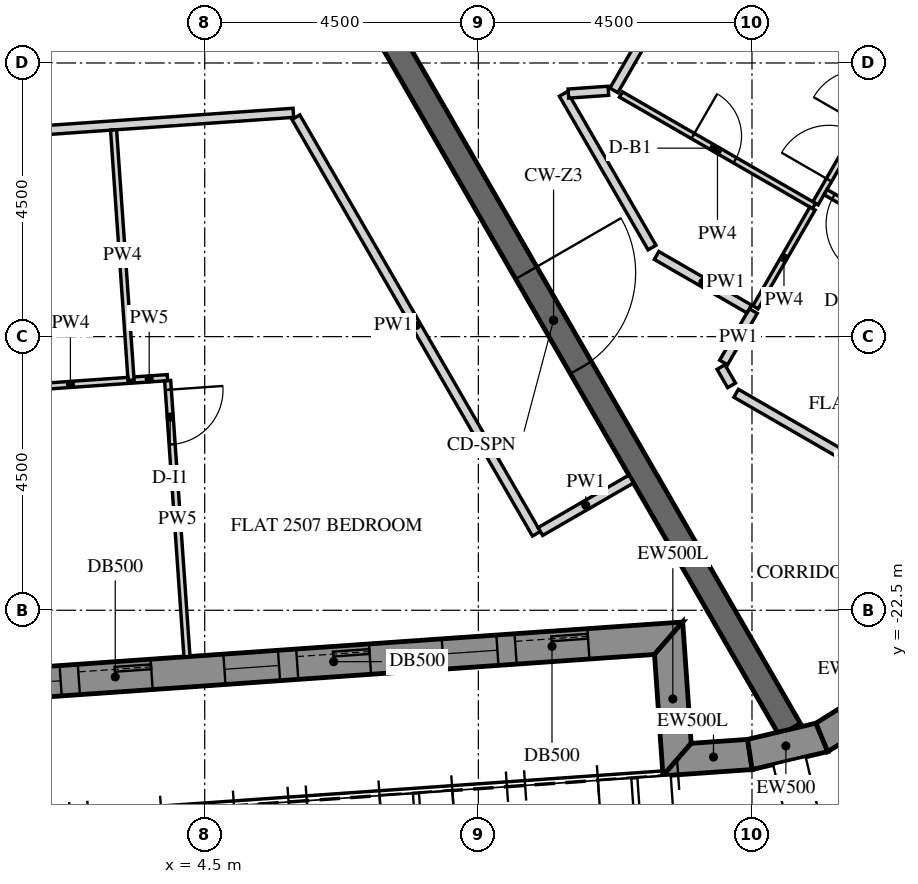
"""IFC4 building model, lengths in metres.
Left out: names, types, materials, properties, quantities, classifications, styles, units other than length and angle.
Written with IfcOpenShell. Run it as: python <this file> out.ifc"""

import sys

from ifc_helpers import new_model, si_unit, direction, frame, frame_2d, origin, place, context, subcontext, project, spatial, polyline, rectangle, outline, extrude, element, fill, save


model = new_model("IFC4")
c1 = context("Model", 3, precision=1e-05, world=origin(), true_north=direction((0.0, 1.0)))
c2 = subcontext(c1, "Body", "Model", "MODEL_VIEW")
j1 = project(units=[si_unit("LENGTHUNIT", "METRE"), si_unit("PLANEANGLEUNIT", "RADIAN")], contexts=[c1])
p1 = place(None, origin())
s1 = spatial("IfcSite", under=j1, at=p1, CompositionType="ELEMENT")
p2 = place(p1, origin())
s2 = spatial("IfcBuilding", under=s1, at=p2, CompositionType="ELEMENT")
p3 = place(p2, frame((0.0, 0.0, 314.7)))
s3 = spatial("IfcBuildingStorey", under=s2, at=p3, CompositionType="ELEMENT", Elevation=314.7)
p4 = place(p3, frame((-10.86, -24.567, -0.15), z_axis=(0.0, 0.0, 1.0), x_axis=(0.997564329317, 0.06975248292, 0.0)))
e1 = element("IfcWall", 1, at=p4, inside=s3, PredefinedType="SOLIDWALL", context=c2, shape_type="SweptSolid", body=[
    extrude(outline(polyline([(0.25, -0.25), (22.795, -0.25), (23.295, 0.25), (-0.25, 0.25), (0.25, -0.25)])), origin(), (0.0, 0.0, 1.0), 3.9),
])
p5 = place(p4, frame((1.323, 0.0, 1.05)))
e2 = element("IfcOpeningElement", 2, at=p5, cuts=e1, PredefinedType="OPENING", context=c2, shape_type="SweptSolid", body=[
    extrude(rectangle(XDim=0.9, YDim=1.5, at=frame_2d((0.45, 0.75))), frame((0.0, 0.26, 0.0), z_axis=(0.0, -1.0, 0.0), x_axis=(1.0, 0.0, 0.0)), (0.0, 0.0, 1.0), 0.52),
])
p6 = place(p4, frame((2.522, 0.0, 0.15)))
e3 = element("IfcOpeningElement", 3, at=p6, cuts=e1, PredefinedType="OPENING", context=c2, shape_type="SweptSolid", body=[
    extrude(rectangle(XDim=1.2, YDim=2.4, at=frame_2d((0.6, 1.2))), frame((0.0, 0.26, 0.0), z_axis=(0.0, -1.0, 0.0), x_axis=(1.0, 0.0, 0.0)), (0.0, 0.0, 1.0), 0.52),
])
p7 = place(p4, frame((4.922, 0.0, 1.05)))
e4 = element("IfcOpeningElement", 4, at=p7, cuts=e1, PredefinedType="OPENING", context=c2, shape_type="SweptSolid", body=[
    extrude(rectangle(XDim=0.9, YDim=1.5, at=frame_2d((0.45, 0.75))), frame((0.0, 0.26, 0.0), z_axis=(0.0, -1.0, 0.0), x_axis=(1.0, 0.0, 0.0)), (0.0, 0.0, 1.0), 0.52),
])
p8 = place(p4, frame((6.122, 0.0, 0.15)))
e5 = element("IfcOpeningElement", 5, at=p8, cuts=e1, PredefinedType="OPENING", context=c2, shape_type="SweptSolid", body=[
    extrude(rectangle(XDim=1.2, YDim=2.4, at=frame_2d((0.6, 1.2))), frame((0.0, 0.26, 0.0), z_axis=(0.0, -1.0, 0.0), x_axis=(1.0, 0.0, 0.0)), (0.0, 0.0, 1.0), 0.52),
])
p9 = place(p4, frame((8.522, 0.0, 1.05)))
e6 = element("IfcOpeningElement", 6, at=p9, cuts=e1, PredefinedType="OPENING", context=c2, shape_type="SweptSolid", body=[
    extrude(rectangle(XDim=0.9, YDim=1.5, at=frame_2d((0.45, 0.75))), frame((0.0, 0.26, 0.0), z_axis=(0.0, -1.0, 0.0), x_axis=(1.0, 0.0, 0.0)), (0.0, 0.0, 1.0), 0.52),
])
p10 = place(p4, frame((9.722, 0.0, 0.15)))
e7 = element("IfcOpeningElement", 7, at=p10, cuts=e1, PredefinedType="OPENING", context=c2, shape_type="SweptSolid", body=[
    extrude(rectangle(XDim=1.2, YDim=2.4, at=frame_2d((0.6, 1.2))), frame((0.0, 0.26, 0.0), z_axis=(0.0, -1.0, 0.0), x_axis=(1.0, 0.0, 0.0)), (0.0, 0.0, 1.0), 0.52),
])
p11 = place(p4, frame((12.122, 0.0, 1.05)))
e8 = element("IfcOpeningElement", 8, at=p11, cuts=e1, PredefinedType="OPENING", context=c2, shape_type="SweptSolid", body=[
    extrude(rectangle(XDim=0.9, YDim=1.5, at=frame_2d((0.45, 0.75))), frame((0.0, 0.26, 0.0), z_axis=(0.0, -1.0, 0.0), x_axis=(1.0, 0.0, 0.0)), (0.0, 0.0, 1.0), 0.52),
])
p12 = place(p4, frame((13.323, 0.0, 0.15)))
e9 = element("IfcOpeningElement", 9, at=p12, cuts=e1, PredefinedType="OPENING", context=c2, shape_type="SweptSolid", body=[
    extrude(rectangle(XDim=1.2, YDim=2.4, at=frame_2d((0.6, 1.2))), frame((0.0, 0.26, 0.0), z_axis=(0.0, -1.0, 0.0), x_axis=(1.0, 0.0, 0.0)), (0.0, 0.0, 1.0), 0.52),
])
p13 = place(p4, frame((15.722, 0.0, 1.05)))
e10 = element("IfcOpeningElement", 10, at=p13, cuts=e1, PredefinedType="OPENING", context=c2, shape_type="SweptSolid", body=[
    extrude(rectangle(XDim=0.9, YDim=1.5, at=frame_2d((0.45, 0.75))), frame((0.0, 0.26, 0.0), z_axis=(0.0, -1.0, 0.0), x_axis=(1.0, 0.0, 0.0)), (0.0, 0.0, 1.0), 0.52),
])
p14 = place(p4, frame((16.922, 0.0, 0.15)))
e11 = element("IfcOpeningElement", 11, at=p14, cuts=e1, PredefinedType="OPENING", context=c2, shape_type="SweptSolid", body=[
    extrude(rectangle(XDim=1.2, YDim=2.4, at=frame_2d((0.6, 1.2))), frame((0.0, 0.26, 0.0), z_axis=(0.0, -1.0, 0.0), x_axis=(1.0, 0.0, 0.0)), (0.0, 0.0, 1.0), 0.52),
])
p15 = place(p4, frame((19.323, 0.0, 1.05)))
e12 = element("IfcOpeningElement", 12, at=p15, cuts=e1, PredefinedType="OPENING", context=c2, shape_type="SweptSolid", body=[
    extrude(rectangle(XDim=0.9, YDim=1.5, at=frame_2d((0.45, 0.75))), frame((0.0, 0.26, 0.0), z_axis=(0.0, -1.0, 0.0), x_axis=(1.0, 0.0, 0.0)), (0.0, 0.0, 1.0), 0.52),
])
p16 = place(p4, frame((20.522, 0.0, 0.15)))
e13 = element("IfcOpeningElement", 13, at=p16, cuts=e1, PredefinedType="OPENING", context=c2, shape_type="SweptSolid", body=[
    extrude(rectangle(XDim=1.2, YDim=2.4, at=frame_2d((0.6, 1.2))), frame((0.0, 0.26, 0.0), z_axis=(0.0, -1.0, 0.0), x_axis=(1.0, 0.0, 0.0)), (0.0, 0.0, 1.0), 0.52),
])
p17 = place(p3, frame((12.129, -22.96, -0.15), z_axis=(0.0, 0.0, 1.0), x_axis=(0.069824268692, -0.99755930726, 0.0)))
e14 = element("IfcWall", 14, at=p17, inside=s3, PredefinedType="SOLIDWALL", context=c2, shape_type="SweptSolid", body=[
    extrude(outline(polyline([(0.25, -0.25), (2.25, -0.25), (1.75, 0.25), (-0.25, 0.25), (0.25, -0.25)])), origin(), (0.0, 0.0, 1.0), 3.9),
])
p18 = place(p3, frame((12.268, -24.955, -0.15), z_axis=(0.0, 0.0, 1.0), x_axis=(0.997561942506, 0.06978660948, 0.0)))
e15 = element("IfcWall", 15, at=p18, inside=s3, PredefinedType="SOLIDWALL", context=c2, shape_type="SweptSolid", body=[
    extrude(outline(polyline([(-0.25, -0.25), (1.22, -0.25), (1.179, 0.25), (0.25, 0.25), (-0.25, -0.25)])), origin(), (0.0, 0.0, 1.0), 3.9),
])
p19 = place(p3, frame((13.465, -24.871, -0.15), z_axis=(0.0, 0.0, 1.0), x_axis=(0.973044740285, 0.230616420501, 0.0)))
e16 = element("IfcWall", 16, at=p19, inside=s3, PredefinedType="SOLIDWALL", context=c2, shape_type="SweptSolid", body=[
    extrude(outline(polyline([(-0.021, -0.25), (1.257, -0.25), (1.175, 0.25), (0.021, 0.25), (-0.021, -0.25)])), origin(), (0.0, 0.0, 1.0), 3.9),
])
p20 = place(p3, frame((14.649, -24.591, -0.15), z_axis=(0.0, 0.0, 1.0), x_axis=(0.848054682072, 0.529908724419, 0.0)))
e17 = element("IfcWall", 17, at=p20, inside=s3, PredefinedType="SOLIDWALL", context=c2, shape_type="SweptSolid", body=[
    extrude(outline(polyline([(-0.041, -0.25), (1.257, -0.25), (1.175, 0.25), (0.041, 0.25), (-0.041, -0.25)])), origin(), (0.0, 0.0, 1.0), 3.9),
])
p21 = place(p3, frame((6.351, -11.0, -0.15), z_axis=(0.0, 0.0, 1.0), x_axis=(0.499998894578, -0.866026041999, 0.0)))
e18 = element("IfcWall", 18, at=p21, inside=s3, PredefinedType="SHEAR", context=c2, shape_type="SweptSolid", body=[
    extrude(rectangle(XDim=15.544, YDim=0.4, at=frame_2d((7.772, 0.0))), origin(), (0.0, 0.0, 1.0), 3.9),
])
p22 = place(p21, frame((6.872, 0.0, 0.15)))
e19 = element("IfcOpeningElement", 19, at=p22, cuts=e18, PredefinedType="OPENING", context=c2, shape_type="SweptSolid", body=[
    extrude(rectangle(XDim=1.8, YDim=2.4, at=frame_2d((0.9, 1.2))), frame((0.0, 0.21, 0.0), z_axis=(0.0, -1.0, 0.0), x_axis=(1.0, 0.0, 0.0)), (0.0, 0.0, 1.0), 0.42),
])
p23 = place(p3, frame((-10.274, -15.454, 0.0), z_axis=(0.0, 0.0, 1.0), x_axis=(0.997564284069, 0.069753130035, 0.0)))
e20 = element("IfcWall", 20, at=p23, inside=s3, PredefinedType="PARTITIONING", context=c2, shape_type="SweptSolid", body=[
    extrude(rectangle(XDim=16.272, YDim=0.15, at=frame_2d((8.136, 0.0))), origin(), (0.0, 0.0, 1.0), 2.988),
])
p24 = place(p23, frame((9.503, 0.0, 0.0)))
e21 = element("IfcOpeningElement", 21, at=p24, cuts=e20, PredefinedType="OPENING", context=c2, shape_type="SweptSolid", body=[
    extrude(rectangle(XDim=1.0, YDim=2.1, at=frame_2d((0.5, 1.05))), frame((0.0, 0.085, 0.0), z_axis=(0.0, -1.0, 0.0), x_axis=(1.0, 0.0, 0.0)), (0.0, 0.0, 1.0), 0.17),
])
p25 = place(p3, frame((6.0, -14.392, 0.0), z_axis=(0.0, 0.0, 1.0), x_axis=(0.499999400414, -0.866025749955, 0.0)))
e22 = element("IfcWall", 22, at=p25, inside=s3, PredefinedType="PARTITIONING", context=c2, shape_type="SweptSolid", body=[
    extrude(rectangle(XDim=7.911, YDim=0.15, at=frame_2d((3.955, 0.0))), origin(), (0.0, 0.0, 1.0), 2.988),
])
p26 = place(p3, frame((10.02, -21.205, 0.0), z_axis=(0.0, 0.0, 1.0), x_axis=(0.866074815912, 0.499914405916, 0.0)))
e23 = element("IfcWall", 23, at=p26, inside=s3, PredefinedType="PARTITIONING", context=c2, shape_type="SweptSolid", body=[
    extrude(rectangle(XDim=1.725, YDim=0.15, at=frame_2d((0.862, 0.0))), origin(), (0.0, 0.0, 1.0), 2.988),
])
p27 = place(p3, frame((6.551, -12.473, 0.0), z_axis=(0.0, 0.0, 1.0), x_axis=(-0.997563421853, -0.069765459797, 0.0)))
e24 = element("IfcWall", 24, at=p27, inside=s3, PredefinedType="PARTITIONING", context=c2, shape_type="SweptSolid", body=[
    extrude(rectangle(XDim=15.95, YDim=0.15, at=frame_2d((7.975, 0.0))), origin(), (0.0, 0.0, 1.0), 2.988),
])
p28 = place(p27, frame((7.525, 0.0, 0.0)))
e25 = element("IfcOpeningElement", 25, at=p28, cuts=e24, PredefinedType="OPENING", context=c2, shape_type="SweptSolid", body=[
    extrude(rectangle(XDim=0.9, YDim=2.1, at=frame_2d((0.45, 1.05))), frame((0.0, 0.085, 0.0), z_axis=(0.0, -1.0, 0.0), x_axis=(1.0, 0.0, 0.0)), (0.0, 0.0, 1.0), 0.17),
])
p29 = place(p3, frame((11.229, -13.951, 0.0), z_axis=(0.0, 0.0, 1.0), x_axis=(0.499997948852, 0.866026588012, 0.0)))
e26 = element("IfcWall", 26, at=p29, inside=s3, PredefinedType="PARTITIONING", context=c2, shape_type="SweptSolid", body=[
    extrude(rectangle(XDim=14.677, YDim=0.15, at=frame_2d((7.339, 0.0))), origin(), (0.0, 0.0, 1.0), 2.988),
])
p30 = place(p29, frame((1.0, 0.0, 0.0)))
e27 = element("IfcOpeningElement", 27, at=p30, cuts=e26, PredefinedType="OPENING", context=c2, shape_type="SweptSolid", body=[
    extrude(rectangle(XDim=1.0, YDim=2.1, at=frame_2d((0.5, 1.05))), frame((0.0, 0.085, 0.0), z_axis=(0.0, -1.0, 0.0), x_axis=(1.0, 0.0, 0.0)), (0.0, 0.0, 1.0), 0.17),
])
p31 = place(p29, frame((13.527, 0.0, 0.0)))
e28 = element("IfcOpeningElement", 28, at=p31, cuts=e26, PredefinedType="OPENING", context=c2, shape_type="SweptSolid", body=[
    extrude(rectangle(XDim=1.0, YDim=2.1, at=frame_2d((0.5, 1.05))), frame((0.0, 0.085, 0.0), z_axis=(0.0, -1.0, 0.0), x_axis=(1.0, 0.0, 0.0)), (0.0, 0.0, 1.0), 0.17),
])
p32 = place(p3, frame((17.196, -21.216, 0.0), z_axis=(0.0, 0.0, 1.0), x_axis=(-0.866028083473, 0.499995358614, 0.0)))
e29 = element("IfcWall", 29, at=p32, inside=s3, PredefinedType="PARTITIONING", context=c2, shape_type="SweptSolid", body=[
    extrude(rectangle(XDim=4.569, YDim=0.15, at=frame_2d((2.284, 0.0))), origin(), (0.0, 0.0, 1.0), 2.988),
])
p33 = place(p3, frame((13.164, -18.801, 0.0), z_axis=(0.0, 0.0, 1.0), x_axis=(-0.499762962979, 0.866162213927, 0.0)))
e30 = element("IfcWall", 30, at=p33, inside=s3, PredefinedType="PARTITIONING", context=c2, shape_type="SweptSolid", body=[
    extrude(rectangle(XDim=0.348, YDim=0.15, at=frame_2d((0.174, 0.0))), origin(), (0.0, 0.0, 1.0), 2.988),
])
p34 = place(p3, frame((13.034, -18.425, 0.0), z_axis=(0.0, 0.0, 1.0), x_axis=(0.500011000363, 0.866019052629, 0.0)))
e31 = element("IfcWall", 31, at=p34, inside=s3, PredefinedType="PARTITIONING", context=c2, shape_type="SweptSolid", body=[
    extrude(rectangle(XDim=0.977, YDim=0.15, at=frame_2d((0.488, 0.0))), origin(), (0.0, 0.0, 1.0), 2.988),
])
p35 = place(p3, frame((13.455, -17.545, 0.0), z_axis=(0.0, 0.0, 1.0), x_axis=(-0.866074688284, 0.499914627025, 0.0)))
e32 = element("IfcWall", 32, at=p35, inside=s3, PredefinedType="PARTITIONING", context=c2, shape_type="SweptSolid", body=[
    extrude(rectangle(XDim=1.76, YDim=0.15, at=frame_2d((0.88, 0.0))), origin(), (0.0, 0.0, 1.0), 2.988),
])
p36 = place(p3, frame((11.856, -16.536, 0.0), z_axis=(0.0, 0.0, 1.0), x_axis=(-0.49996389635, 0.866046247233, 0.0)))
e33 = element("IfcWall", 33, at=p36, inside=s3, PredefinedType="PARTITIONING", context=c2, shape_type="SweptSolid", body=[
    extrude(rectangle(XDim=2.918, YDim=0.15, at=frame_2d((1.459, 0.0))), origin(), (0.0, 0.0, 1.0), 2.988),
])
p37 = place(p3, frame((10.481, -14.003, 0.0), z_axis=(0.0, 0.0, 1.0), x_axis=(0.997577490052, 0.06956400895, 0.0)))
e34 = element("IfcWall", 34, at=p37, inside=s3, PredefinedType="PARTITIONING", context=c2, shape_type="SweptSolid", body=[
    extrude(rectangle(XDim=0.66, YDim=0.15, at=frame_2d((0.33, 0.0))), origin(), (0.0, 0.0, 1.0), 2.988),
])
p38 = place(p3, frame((3.287, -18.716, 0.0), z_axis=(0.0, 0.0, 1.0), x_axis=(0.997564613391, 0.069748420123, 0.0)))
e35 = element("IfcWall", 35, at=p38, inside=s3, PredefinedType="PARTITIONING", context=c2, shape_type="SweptSolid", body=[
    extrude(rectangle(XDim=0.602, YDim=0.1, at=frame_2d((0.301, 0.0))), origin(), (0.0, 0.0, 1.0), 2.988),
])
p39 = place(p3, frame((3.891, -18.724, 0.0), z_axis=(0.0, 0.0, 1.0), x_axis=(0.06975224022, -0.997564346288, 0.0)))
e36 = element("IfcWall", 36, at=p39, inside=s3, PredefinedType="PARTITIONING", context=c2, shape_type="SweptSolid", body=[
    extrude(rectangle(XDim=4.55, YDim=0.1, at=frame_2d((2.275, 0.0))), origin(), (0.0, 0.0, 1.0), 2.988),
])
p40 = place(p39, frame((0.15, 0.0, 0.0)))
e37 = element("IfcOpeningElement", 37, at=p40, cuts=e36, PredefinedType="OPENING", context=c2, shape_type="SweptSolid", body=[
    extrude(rectangle(XDim=0.9, YDim=2.1, at=frame_2d((0.45, 1.05))), frame((0.0, 0.06, 0.0), z_axis=(0.0, -1.0, 0.0), x_axis=(1.0, 0.0, 0.0)), (0.0, 0.0, 1.0), 0.12),
])
p41 = place(p3, frame((3.001, -14.601, 0.0), z_axis=(0.0, 0.0, 1.0), x_axis=(0.06972428516, -0.997566300583, 0.0)))
e38 = element("IfcWall", 38, at=p41, inside=s3, PredefinedType="PARTITIONING", context=c2, shape_type="SweptSolid", body=[
    extrude(rectangle(XDim=4.125, YDim=0.1, at=frame_2d((2.062, 0.0))), origin(), (0.0, 0.0, 1.0), 2.988),
])
p42 = place(p3, frame((3.239, -18.72, 0.0), z_axis=(0.0, 0.0, 1.0), x_axis=(-0.997563261324, -0.069767755139, 0.0)))
e39 = element("IfcWall", 39, at=p42, inside=s3, PredefinedType="PARTITIONING", context=c2, shape_type="SweptSolid", body=[
    extrude(rectangle(XDim=1.9, YDim=0.1, at=frame_2d((0.95, 0.0))), origin(), (0.0, 0.0, 1.0), 2.988),
])
p43 = place(p3, frame((14.544, -15.809, 0.0), z_axis=(0.0, 0.0, 1.0), x_axis=(0.500032473623, 0.866006654318, 0.0)))
e40 = element("IfcWall", 40, at=p43, inside=s3, PredefinedType="PARTITIONING", context=c2, shape_type="SweptSolid", body=[
    extrude(rectangle(XDim=2.954, YDim=0.1, at=frame_2d((1.477, 0.0))), origin(), (0.0, 0.0, 1.0), 2.988),
])
p44 = place(p43, frame((0.444, 0.0, 0.0)))
e41 = element("IfcOpeningElement", 41, at=p44, cuts=e40, PredefinedType="OPENING", context=c2, shape_type="SweptSolid", body=[
    extrude(rectangle(XDim=0.9, YDim=2.1, at=frame_2d((0.45, 1.05))), frame((0.0, 0.06, 0.0), z_axis=(0.0, -1.0, 0.0), x_axis=(1.0, 0.0, 0.0)), (0.0, 0.0, 1.0), 0.12),
])
p45 = place(p43, frame((1.498, 0.0, 0.0)))
e42 = element("IfcOpeningElement", 42, at=p45, cuts=e40, PredefinedType="OPENING", context=c2, shape_type="SweptSolid", body=[
    extrude(rectangle(XDim=0.9, YDim=2.1, at=frame_2d((0.45, 1.05))), frame((0.0, 0.06, 0.0), z_axis=(0.0, -1.0, 0.0), x_axis=(1.0, 0.0, 0.0)), (0.0, 0.0, 1.0), 0.12),
])
p46 = place(p3, frame((11.345, -14.018, 0.0), z_axis=(0.0, 0.0, 1.0), x_axis=(0.866050287132, -0.499956898301, 0.0)))
e43 = element("IfcWall", 43, at=p46, inside=s3, PredefinedType="PARTITIONING", context=c2, shape_type="SweptSolid", body=[
    extrude(rectangle(XDim=3.666, YDim=0.1, at=frame_2d((1.833, 0.0))), origin(), (0.0, 0.0, 1.0), 2.988),
])
p47 = place(p46, frame((1.366, 0.0, 0.0)))
e44 = element("IfcOpeningElement", 44, at=p47, cuts=e43, PredefinedType="OPENING", context=c2, shape_type="SweptSolid", body=[
    extrude(rectangle(XDim=0.8, YDim=2.1, at=frame_2d((0.4, 1.05))), frame((0.0, 0.06, 0.0), z_axis=(0.0, -1.0, 0.0), x_axis=(1.0, 0.0, 0.0)), (0.0, 0.0, 1.0), 0.12),
])
p48 = place(p3, frame((18.996, -18.098, 0.0), z_axis=(0.0, 0.0, 1.0), x_axis=(-0.866018855338, 0.500011342071, 0.0)))
e45 = element("IfcWall", 45, at=p48, inside=s3, PredefinedType="PARTITIONING", context=c2, shape_type="SweptSolid", body=[
    extrude(rectangle(XDim=4.95, YDim=0.1, at=frame_2d((2.475, 0.0))), origin(), (0.0, 0.0, 1.0), 2.988),
])
p49 = place(p48, frame((3.9, 0.0, 0.0)))
e46 = element("IfcOpeningElement", 46, at=p49, cuts=e45, PredefinedType="OPENING", context=c2, shape_type="SweptSolid", body=[
    extrude(rectangle(XDim=0.9, YDim=2.1, at=frame_2d((0.45, 1.05))), frame((0.0, 0.06, 0.0), z_axis=(0.0, -1.0, 0.0), x_axis=(1.0, 0.0, 0.0)), (0.0, 0.0, 1.0), 0.12),
])
p50 = place(p3, frame((14.495, -15.894, 0.0), z_axis=(0.0, 0.0, 1.0), x_axis=(-0.500004234368, -0.866022959057, 0.0)))
e47 = element("IfcWall", 47, at=p50, inside=s3, PredefinedType="PARTITIONING", context=c2, shape_type="SweptSolid", body=[
    extrude(rectangle(XDim=1.875, YDim=0.1, at=frame_2d((0.938, 0.0))), origin(), (0.0, 0.0, 1.0), 2.988),
])
p51 = place(p11, frame((0.0, 0.18, 0.0)))
e48 = element("IfcWindow", 48, at=p51, inside=s3, PartitioningType="SINGLE_PANEL", PredefinedType="WINDOW", context=c2, shape_type="SweptSolid", body=[
    extrude(rectangle(XDim=0.9, YDim=1.5, at=frame_2d((0.45, 0.75))), frame((0.0, 0.03, 0.0), z_axis=(0.0, -1.0, 0.0), x_axis=(1.0, 0.0, 0.0)), (0.0, 0.0, 1.0), 0.06),
])
fill(e8, e48)
p52 = place(p12, frame((0.0, 0.175, 0.0)))
e49 = element("IfcDoor", 49, at=p52, inside=s3, OperationType="SLIDING_TO_LEFT", PredefinedType="DOOR", context=c2, shape_type="SweptSolid", body=[
    extrude(rectangle(XDim=1.2, YDim=2.4, at=frame_2d((0.6, 1.2))), frame((0.0, 0.025, 0.0), z_axis=(0.0, -1.0, 0.0), x_axis=(1.0, 0.0, 0.0)), (0.0, 0.0, 1.0), 0.05),
])
fill(e9, e49)
p53 = place(p13, frame((0.0, 0.18, 0.0)))
e50 = element("IfcWindow", 50, at=p53, inside=s3, PartitioningType="SINGLE_PANEL", PredefinedType="WINDOW", context=c2, shape_type="SweptSolid", body=[
    extrude(rectangle(XDim=0.9, YDim=1.5, at=frame_2d((0.45, 0.75))), frame((0.0, 0.03, 0.0), z_axis=(0.0, -1.0, 0.0), x_axis=(1.0, 0.0, 0.0)), (0.0, 0.0, 1.0), 0.06),
])
fill(e10, e50)
p54 = place(p14, frame((0.0, 0.175, 0.0)))
e51 = element("IfcDoor", 51, at=p54, inside=s3, OperationType="SLIDING_TO_LEFT", PredefinedType="DOOR", context=c2, shape_type="SweptSolid", body=[
    extrude(rectangle(XDim=1.2, YDim=2.4, at=frame_2d((0.6, 1.2))), frame((0.0, 0.025, 0.0), z_axis=(0.0, -1.0, 0.0), x_axis=(1.0, 0.0, 0.0)), (0.0, 0.0, 1.0), 0.05),
])
fill(e11, e51)
p55 = place(p15, frame((0.0, 0.18, 0.0)))
e52 = element("IfcWindow", 52, at=p55, inside=s3, PartitioningType="SINGLE_PANEL", PredefinedType="WINDOW", context=c2, shape_type="SweptSolid", body=[
    extrude(rectangle(XDim=0.9, YDim=1.5, at=frame_2d((0.45, 0.75))), frame((0.0, 0.03, 0.0), z_axis=(0.0, -1.0, 0.0), x_axis=(1.0, 0.0, 0.0)), (0.0, 0.0, 1.0), 0.06),
])
fill(e12, e52)
p56 = place(p16, frame((0.0, 0.175, 0.0)))
e53 = element("IfcDoor", 53, at=p56, inside=s3, OperationType="SLIDING_TO_LEFT", PredefinedType="DOOR", context=c2, shape_type="SweptSolid", body=[
    extrude(rectangle(XDim=1.2, YDim=2.4, at=frame_2d((0.6, 1.2))), frame((0.0, 0.025, 0.0), z_axis=(0.0, -1.0, 0.0), x_axis=(1.0, 0.0, 0.0)), (0.0, 0.0, 1.0), 0.05),
])
fill(e13, e53)
p57 = place(p22, origin())
e54 = element("IfcDoor", 54, at=p57, inside=s3, OperationType="DOUBLE_DOOR_SINGLE_SWING", PredefinedType="DOOR", context=c2, shape_type="SweptSolid", body=[
    extrude(rectangle(XDim=1.8, YDim=2.4, at=frame_2d((0.9, 1.2))), frame((0.0, 0.025, 0.0), z_axis=(0.0, -1.0, 0.0), x_axis=(1.0, 0.0, 0.0)), (0.0, 0.0, 1.0), 0.05),
])
fill(e19, e54)
p58 = place(p40, origin())
e55 = element("IfcDoor", 55, at=p58, inside=s3, OperationType="SINGLE_SWING_RIGHT", PredefinedType="DOOR", context=c2, shape_type="SweptSolid", body=[
    extrude(rectangle(XDim=0.9, YDim=2.1, at=frame_2d((0.45, 1.05))), frame((0.0, 0.025, 0.0), z_axis=(0.0, -1.0, 0.0), x_axis=(1.0, 0.0, 0.0)), (0.0, 0.0, 1.0), 0.05),
])
fill(e37, e55)
p59 = place(p44, origin())
e56 = element("IfcDoor", 56, at=p59, inside=s3, OperationType="SINGLE_SWING_LEFT", PredefinedType="DOOR", context=c2, shape_type="SweptSolid", body=[
    extrude(rectangle(XDim=0.9, YDim=2.1, at=frame_2d((0.45, 1.05))), frame((0.0, 0.025, 0.0), z_axis=(0.0, -1.0, 0.0), x_axis=(1.0, 0.0, 0.0)), (0.0, 0.0, 1.0), 0.05),
])
fill(e41, e56)
p60 = place(p49, origin())
e57 = element("IfcDoor", 57, at=p60, inside=s3, OperationType="SINGLE_SWING_RIGHT", PredefinedType="DOOR", context=c2, shape_type="SweptSolid", body=[
    extrude(rectangle(XDim=0.9, YDim=2.1, at=frame_2d((0.45, 1.05))), frame((0.0, 0.025, 0.0), z_axis=(0.0, -1.0, 0.0), x_axis=(1.0, 0.0, 0.0)), (0.0, 0.0, 1.0), 0.05),
])
fill(e46, e57)
p61 = place(p47, origin())
e58 = element("IfcDoor", 58, at=p61, inside=s3, OperationType="SINGLE_SWING_RIGHT", PredefinedType="DOOR", context=c2, shape_type="SweptSolid", body=[
    extrude(rectangle(XDim=0.8, YDim=2.1, at=frame_2d((0.4, 1.05))), frame((0.0, 0.025, 0.0), z_axis=(0.0, -1.0, 0.0), x_axis=(1.0, 0.0, 0.0)), (0.0, 0.0, 1.0), 0.05),
])
fill(e44, e58)
save(model, sys.argv[1])
